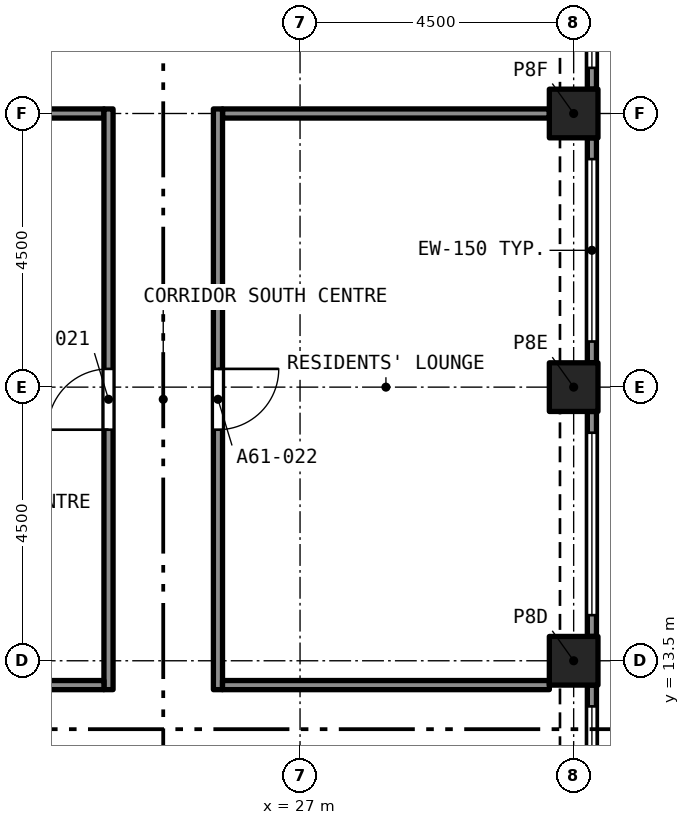
"""IFC4 building model, lengths in metres.
Left out: names, types, materials, properties, quantities, classifications, styles, units other than length and angle.
Written with IfcOpenShell. Run it as: python <this file> out.ifc"""

import sys

from ifc_helpers import new_model, si_unit, direction, frame, frame_2d, origin, origin_2d, place, context, subcontext, project, spatial, rectangle, extrude, element, fill, save


model = new_model("IFC4")
c1 = context("Model", 3, precision=1e-05, world=origin(), true_north=direction((0.0, 1.0)))
c2 = subcontext(c1, "Body", "Model", "MODEL_VIEW")
j1 = project(units=[si_unit("LENGTHUNIT", "METRE"), si_unit("PLANEANGLEUNIT", "RADIAN")], contexts=[c1])
p1 = place(None, origin())
s1 = spatial("IfcSite", under=j1, at=p1, CompositionType="ELEMENT")
p2 = place(p1, origin())
s2 = spatial("IfcBuilding", under=s1, at=p2, CompositionType="ELEMENT")
p3 = place(p2, frame((0.0, 0.0, 219.695)))
s3 = spatial("IfcBuildingStorey", under=s2, at=p3, CompositionType="ELEMENT", Elevation=219.695)
for number, where, z_axis, x_axis in (
    (1, (31.5, 13.5, 0.0), (0.0, 0.0, 1.0), (1.0, 0.0, 0.0)),
    (2, (31.5, 18.0, 0.0), (0.0, 0.0, 1.0), (1.0, 0.0, 0.0)),
    (3, (31.5, 22.5, 0.0), (0.0, 0.0, 1.0), (1.0, 0.0, 0.0)),
):
    element("IfcColumn", number, at=place(p3, frame(where, z_axis=z_axis, x_axis=x_axis)), inside=s3, PredefinedType="COLUMN", context=c2, shape_type="SweptSolid", body=[
        extrude(rectangle(XDim=0.8, YDim=0.8, at=origin_2d()), origin(), (0.0, 0.0, 1.0), 3.2),
    ])
p4 = place(p3, frame((31.8, 13.1, 0.0), z_axis=(0.0, 0.0, 1.0), x_axis=(0.0, -1.0, 0.0)))
e4 = element("IfcWall", 4, at=p4, inside=s3, PredefinedType="SOLIDWALL", context=c2, shape_type="SweptSolid", body=[
    extrude(rectangle(XDim=3.7, YDim=0.15, at=frame_2d((1.85, 0.0))), origin(), (0.0, 0.0, 1.0), 3.2),
])
p5 = place(p4, frame((0.35, 0.0, 0.45)))
e5 = element("IfcOpeningElement", 5, at=p5, cuts=e4, PredefinedType="OPENING", context=c2, shape_type="SweptSolid", body=[
    extrude(rectangle(XDim=3.0, YDim=1.95, at=frame_2d((1.5, 0.975))), frame((0.0, 0.085, 0.0), z_axis=(0.0, -1.0, 0.0), x_axis=(1.0, 0.0, 0.0)), (0.0, 0.0, 1.0), 0.17),
])
p6 = place(p3, frame((31.8, 17.6, 0.0), z_axis=(0.0, 0.0, 1.0), x_axis=(0.0, -1.0, 0.0)))
e6 = element("IfcWall", 6, at=p6, inside=s3, PredefinedType="SOLIDWALL", context=c2, shape_type="SweptSolid", body=[
    extrude(rectangle(XDim=3.7, YDim=0.15, at=frame_2d((1.85, 0.0))), origin(), (0.0, 0.0, 1.0), 3.2),
])
p7 = place(p6, frame((0.35, 0.0, 0.45)))
e7 = element("IfcOpeningElement", 7, at=p7, cuts=e6, PredefinedType="OPENING", context=c2, shape_type="SweptSolid", body=[
    extrude(rectangle(XDim=3.0, YDim=1.95, at=frame_2d((1.5, 0.975))), frame((0.0, 0.085, 0.0), z_axis=(0.0, -1.0, 0.0), x_axis=(1.0, 0.0, 0.0)), (0.0, 0.0, 1.0), 0.17),
])
p8 = place(p3, frame((31.8, 22.1, 0.0), z_axis=(0.0, 0.0, 1.0), x_axis=(0.0, -1.0, 0.0)))
e8 = element("IfcWall", 8, at=p8, inside=s3, PredefinedType="SOLIDWALL", context=c2, shape_type="SweptSolid", body=[
    extrude(rectangle(XDim=3.7, YDim=0.15, at=frame_2d((1.85, 0.0))), origin(), (0.0, 0.0, 1.0), 3.2),
])
p9 = place(p8, frame((0.35, 0.0, 0.45)))
e9 = element("IfcOpeningElement", 9, at=p9, cuts=e8, PredefinedType="OPENING", context=c2, shape_type="SweptSolid", body=[
    extrude(rectangle(XDim=3.0, YDim=1.95, at=frame_2d((1.5, 0.975))), frame((0.0, 0.085, 0.0), z_axis=(0.0, -1.0, 0.0), x_axis=(1.0, 0.0, 0.0)), (0.0, 0.0, 1.0), 0.17),
])
p10 = place(p3, frame((31.8, 26.6, 0.0), z_axis=(0.0, 0.0, 1.0), x_axis=(0.0, -1.0, 0.0)))
e10 = element("IfcWall", 10, at=p10, inside=s3, PredefinedType="SOLIDWALL", context=c2, shape_type="SweptSolid", body=[
    extrude(rectangle(XDim=3.7, YDim=0.15, at=frame_2d((1.85, 0.0))), origin(), (0.0, 0.0, 1.0), 3.2),
])
p11 = place(p10, frame((0.35, 0.0, 0.45)))
e11 = element("IfcOpeningElement", 11, at=p11, cuts=e10, PredefinedType="OPENING", context=c2, shape_type="SweptSolid", body=[
    extrude(rectangle(XDim=3.0, YDim=1.95, at=frame_2d((1.5, 0.975))), frame((0.0, 0.085, 0.0), z_axis=(0.0, -1.0, 0.0), x_axis=(1.0, 0.0, 0.0)), (0.0, 0.0, 1.0), 0.17),
])
for number, where, z_axis, x_axis in (
    (12, (18.4, 22.5, 0.0), (0.0, 0.0, 1.0), (1.0, 0.0, 0.0)),
    (13, (25.725, 22.5, 0.0), (0.0, 0.0, 1.0), (1.0, 0.0, 0.0)),
):
    element("IfcWall", number, at=place(p3, frame(where, z_axis=z_axis, x_axis=x_axis)), inside=s3, PredefinedType="PARTITIONING", context=c2, shape_type="SweptSolid", body=[
        extrude(rectangle(XDim=5.375, YDim=0.15, at=frame_2d((2.688, 0.0))), origin(), (0.0, 0.0, 1.0), 2.75),
    ])
p12 = place(p3, frame((23.85, 13.025, 0.0), z_axis=(0.0, 0.0, 1.0), x_axis=(0.0, 1.0, 0.0)))
e14 = element("IfcWall", 14, at=p12, inside=s3, PredefinedType="PARTITIONING", context=c2, shape_type="SweptSolid", body=[
    extrude(rectangle(XDim=9.55, YDim=0.15, at=frame_2d((4.775, 0.0))), origin(), (0.0, 0.0, 1.0), 2.75),
])
p13 = place(p12, frame((4.275, 0.0, 0.0)))
e15 = element("IfcOpeningElement", 15, at=p13, cuts=e14, PredefinedType="OPENING", context=c2, shape_type="SweptSolid", body=[
    extrude(rectangle(XDim=1.0, YDim=2.1, at=frame_2d((0.5, 1.05))), frame((0.0, 0.085, 0.0), z_axis=(0.0, -1.0, 0.0), x_axis=(1.0, 0.0, 0.0)), (0.0, 0.0, 1.0), 0.17),
])
p14 = place(p3, frame((25.65, 22.575, 0.0), z_axis=(0.0, 0.0, 1.0), x_axis=(0.0, -1.0, 0.0)))
e16 = element("IfcWall", 16, at=p14, inside=s3, PredefinedType="PARTITIONING", context=c2, shape_type="SweptSolid", body=[
    extrude(rectangle(XDim=9.55, YDim=0.15, at=frame_2d((4.775, 0.0))), origin(), (0.0, 0.0, 1.0), 2.75),
])
p15 = place(p14, frame((4.275, 0.0, 0.0)))
e17 = element("IfcOpeningElement", 17, at=p15, cuts=e16, PredefinedType="OPENING", context=c2, shape_type="SweptSolid", body=[
    extrude(rectangle(XDim=1.0, YDim=2.1, at=frame_2d((0.5, 1.05))), frame((0.0, 0.085, 0.0), z_axis=(0.0, -1.0, 0.0), x_axis=(1.0, 0.0, 0.0)), (0.0, 0.0, 1.0), 0.17),
])
for number, where, z_axis, x_axis in (
    (18, (18.4, 13.1, 0.0), (0.0, 0.0, 1.0), (1.0, 0.0, 0.0)),
    (19, (25.725, 13.1, 0.0), (0.0, 0.0, 1.0), (1.0, 0.0, 0.0)),
):
    element("IfcWall", number, at=place(p3, frame(where, z_axis=z_axis, x_axis=x_axis)), inside=s3, PredefinedType="PARTITIONING", context=c2, shape_type="SweptSolid", body=[
        extrude(rectangle(XDim=5.375, YDim=0.15, at=frame_2d((2.688, 0.0))), origin(), (0.0, 0.0, 1.0), 2.75),
    ])
p16 = place(p5, origin())
e20 = element("IfcWindow", 20, at=p16, inside=s3, PartitioningType="SINGLE_PANEL", PredefinedType="WINDOW", context=c2, shape_type="SweptSolid", body=[
    extrude(rectangle(XDim=3.0, YDim=1.95, at=frame_2d((1.5, 0.975))), frame((0.0, 0.03, 0.0), z_axis=(0.0, -1.0, 0.0), x_axis=(1.0, 0.0, 0.0)), (0.0, 0.0, 1.0), 0.06),
])
fill(e5, e20)
p17 = place(p7, origin())
e21 = element("IfcWindow", 21, at=p17, inside=s3, PartitioningType="SINGLE_PANEL", PredefinedType="WINDOW", context=c2, shape_type="SweptSolid", body=[
    extrude(rectangle(XDim=3.0, YDim=1.95, at=frame_2d((1.5, 0.975))), frame((0.0, 0.03, 0.0), z_axis=(0.0, -1.0, 0.0), x_axis=(1.0, 0.0, 0.0)), (0.0, 0.0, 1.0), 0.06),
])
fill(e7, e21)
p18 = place(p9, origin())
e22 = element("IfcWindow", 22, at=p18, inside=s3, PartitioningType="SINGLE_PANEL", PredefinedType="WINDOW", context=c2, shape_type="SweptSolid", body=[
    extrude(rectangle(XDim=3.0, YDim=1.95, at=frame_2d((1.5, 0.975))), frame((0.0, 0.03, 0.0), z_axis=(0.0, -1.0, 0.0), x_axis=(1.0, 0.0, 0.0)), (0.0, 0.0, 1.0), 0.06),
])
fill(e9, e22)
p19 = place(p11, origin())
e23 = element("IfcWindow", 23, at=p19, inside=s3, PartitioningType="SINGLE_PANEL", PredefinedType="WINDOW", context=c2, shape_type="SweptSolid", body=[
    extrude(rectangle(XDim=3.0, YDim=1.95, at=frame_2d((1.5, 0.975))), frame((0.0, 0.03, 0.0), z_axis=(0.0, -1.0, 0.0), x_axis=(1.0, 0.0, 0.0)), (0.0, 0.0, 1.0), 0.06),
])
fill(e11, e23)
p20 = place(p13, origin())
e24 = element("IfcDoor", 24, at=p20, inside=s3, OperationType="SINGLE_SWING_RIGHT", PredefinedType="DOOR", context=c2, shape_type="SweptSolid", body=[
    extrude(rectangle(XDim=1.0, YDim=2.1, at=frame_2d((0.5, 1.05))), frame((0.0, 0.025, 0.0), z_axis=(0.0, -1.0, 0.0), x_axis=(1.0, 0.0, 0.0)), (0.0, 0.0, 1.0), 0.05),
])
fill(e15, e24)
p21 = place(p15, origin())
e25 = element("IfcDoor", 25, at=p21, inside=s3, OperationType="SINGLE_SWING_LEFT", PredefinedType="DOOR", context=c2, shape_type="SweptSolid", body=[
    extrude(rectangle(XDim=1.0, YDim=2.1, at=frame_2d((0.5, 1.05))), frame((0.0, 0.025, 0.0), z_axis=(0.0, -1.0, 0.0), x_axis=(1.0, 0.0, 0.0)), (0.0, 0.0, 1.0), 0.05),
])
fill(e17, e25)
save(model, sys.argv[1])
